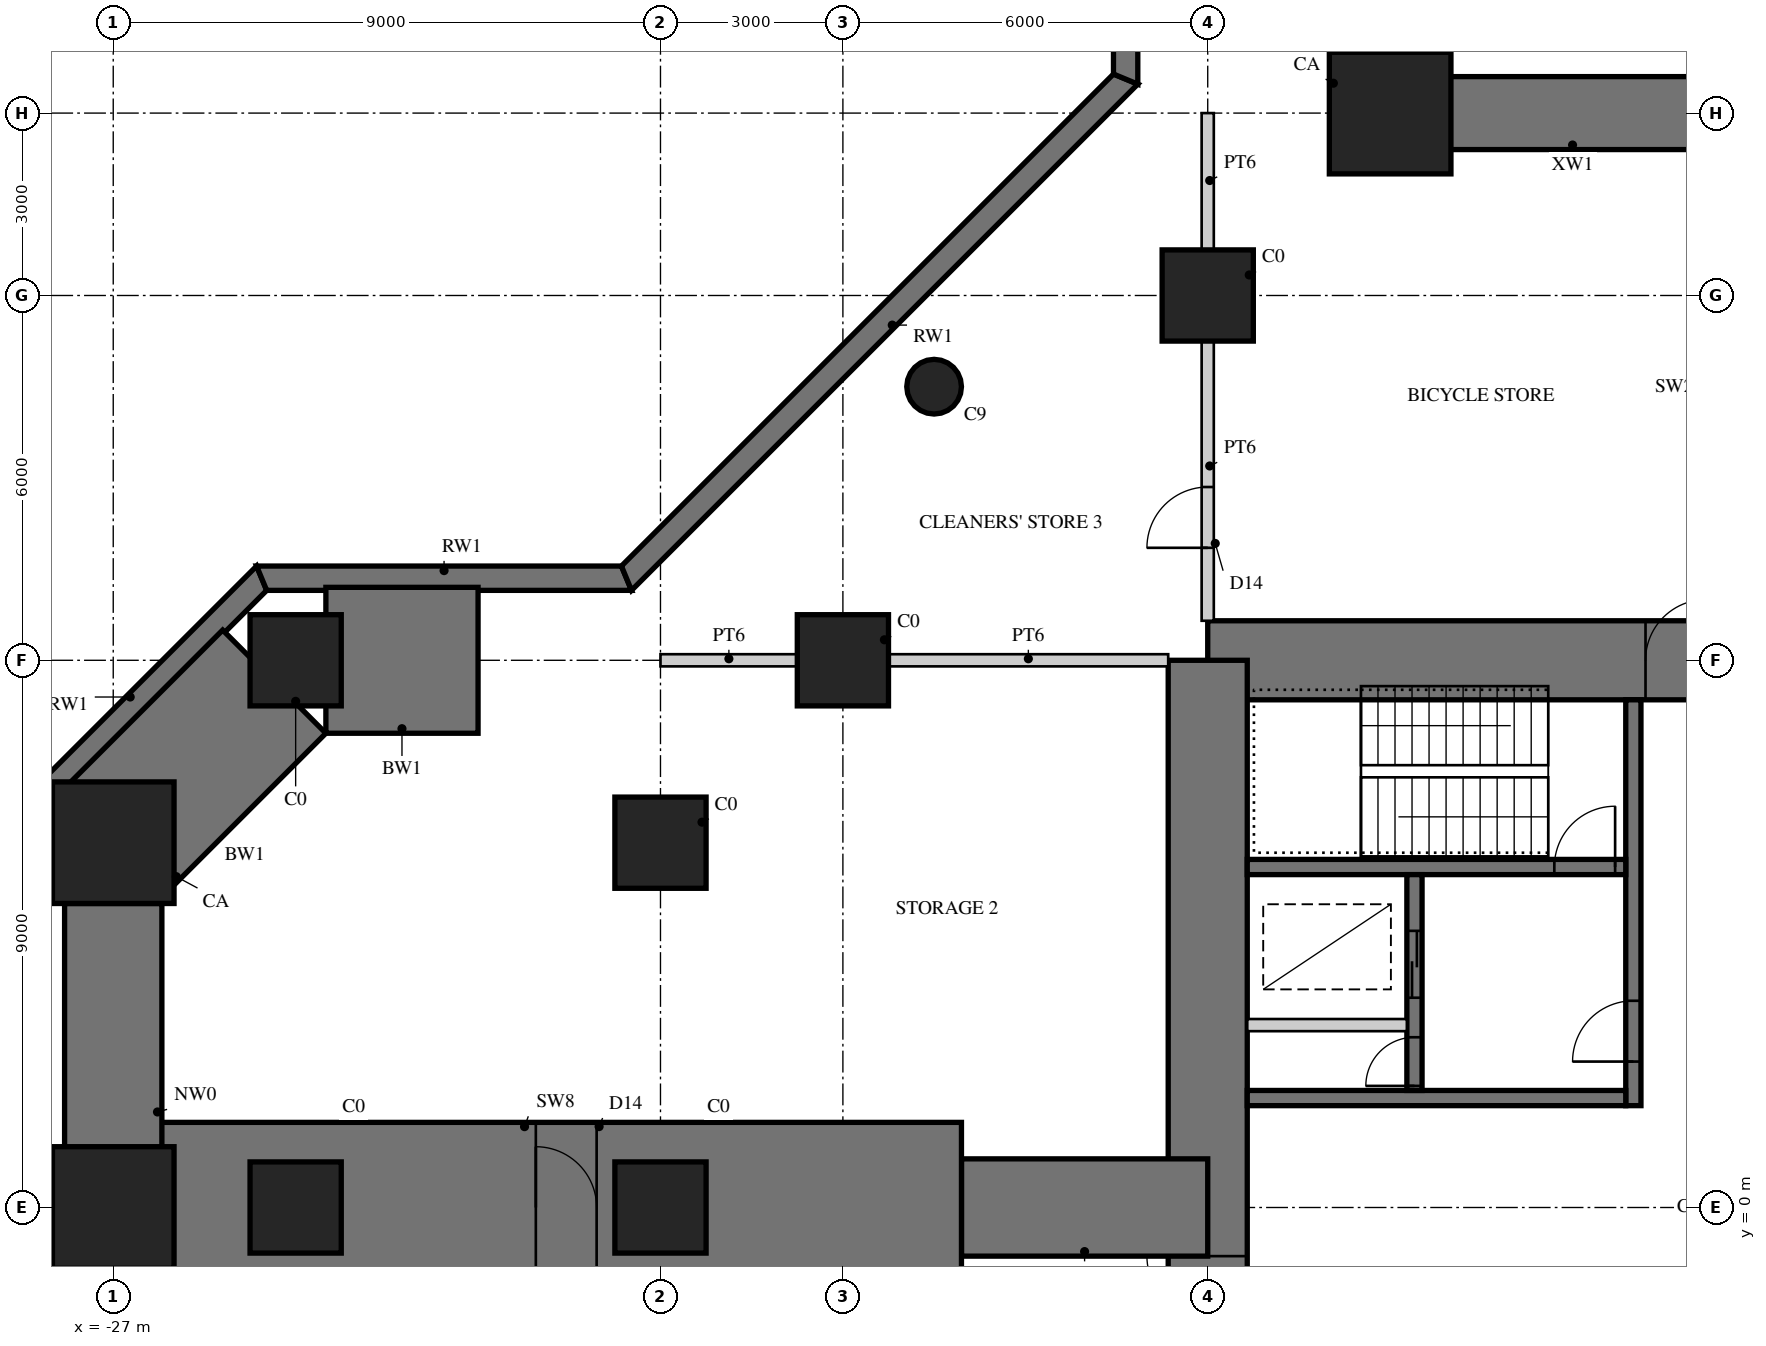
"""IFC4 building model, lengths in metres.
Left out: names, types, materials, properties, quantities, classifications, styles, units other than length and angle.
Written with IfcOpenShell. Run it as: python <this file> out.ifc"""

import sys

from ifc_helpers import new_model, si_unit, direction, frame, frame_2d, origin, origin_2d, place, context, subcontext, project, spatial, polyline, rectangle, circle, outline, extrude, element, fill, save


model = new_model("IFC4")
c1 = context("Model", 3, precision=1e-05, world=origin(), true_north=direction((0.0, 1.0)))
c2 = subcontext(c1, "Body", "Model", "MODEL_VIEW")
j1 = project(units=[si_unit("LENGTHUNIT", "METRE"), si_unit("PLANEANGLEUNIT", "RADIAN")], contexts=[c1])
p1 = place(None, origin())
s1 = spatial("IfcSite", under=j1, at=p1, CompositionType="ELEMENT")
p2 = place(p1, origin())
s2 = spatial("IfcBuilding", under=s1, at=p2, CompositionType="ELEMENT")
p3 = place(p2, frame((0.0, 0.0, -4.0)))
s3 = spatial("IfcBuildingStorey", under=s2, at=p3, CompositionType="ELEMENT", Elevation=-4.0)
p4 = place(p3, origin())
e1 = element("IfcWall", 1, at=p4, inside=s3, PredefinedType="SOLIDWALL", context=c2, shape_type="SweptSolid", body=[
    extrude(outline(polyline([(-28.15, 6.476), (-28.55, 6.642), (-24.642, 10.55), (-24.476, 10.15), (-28.15, 6.476)])), origin(), (0.0, 0.0, 1.0), 4.0),
])
p5 = place(p3, origin())
e2 = element("IfcWall", 2, at=p5, inside=s3, PredefinedType="SOLIDWALL", context=c2, shape_type="SweptSolid", body=[
    extrude(outline(polyline([(-24.476, 10.15), (-24.642, 10.55), (-18.642, 10.55), (-18.476, 10.15), (-24.476, 10.15)])), origin(), (0.0, 0.0, 1.0), 4.0),
])
p6 = place(p3, origin())
e3 = element("IfcWall", 3, at=p6, inside=s3, PredefinedType="SOLIDWALL", context=c2, shape_type="SweptSolid", body=[
    extrude(outline(polyline([(-18.476, 10.15), (-18.642, 10.55), (-10.55, 18.642), (-10.15, 18.476), (-18.476, 10.15)])), origin(), (0.0, 0.0, 1.0), 4.0),
])
p7 = place(p3, origin())
e4 = element("IfcWall", 4, at=p7, inside=s3, PredefinedType="SOLIDWALL", context=c2, shape_type="SweptSolid", body=[
    extrude(outline(polyline([(-10.15, 18.476), (-10.55, 18.642), (-10.55, 24.642), (-10.15, 24.476), (-10.15, 18.476)])), origin(), (0.0, 0.0, 1.0), 4.0),
])
p8 = place(p3, frame((9.0, 9.0, 0.0), z_axis=(0.0, 0.0, 1.0), x_axis=(-1.0, 0.0, 0.0)))
e5 = element("IfcWall", 5, at=p8, inside=s3, PredefinedType="SHEAR", context=c2, shape_type="SweptSolid", body=[
    extrude(rectangle(XDim=18.0, YDim=1.3, at=frame_2d((9.0, 0.0))), origin(), (0.0, 0.0, 1.0), 4.0),
])
p9 = place(p8, frame((9.8, 0.0, 0.0)))
e6 = element("IfcOpeningElement", 6, at=p9, cuts=e5, PredefinedType="OPENING", context=c2, shape_type="SweptSolid", body=[
    extrude(rectangle(XDim=1.0, YDim=2.4, at=frame_2d((0.5, 1.2))), frame((0.0, 0.66, 0.0), z_axis=(0.0, -1.0, 0.0), x_axis=(1.0, 0.0, 0.0)), (0.0, 0.0, 1.0), 1.32),
])
p10 = place(p3, frame((-9.0, 9.0, 0.0), z_axis=(0.0, 0.0, 1.0), x_axis=(0.0, -1.0, 0.0)))
e7 = element("IfcWall", 7, at=p10, inside=s3, PredefinedType="SHEAR", context=c2, shape_type="SweptSolid", body=[
    extrude(rectangle(XDim=18.0, YDim=1.3, at=frame_2d((9.0, 0.0))), origin(), (0.0, 0.0, 1.0), 4.0),
])
p11 = place(p10, frame((9.8, 0.0, 0.0)))
e8 = element("IfcOpeningElement", 8, at=p11, cuts=e7, PredefinedType="OPENING", context=c2, shape_type="SweptSolid", body=[
    extrude(rectangle(XDim=1.0, YDim=2.4, at=frame_2d((0.5, 1.2))), frame((0.0, 0.66, 0.0), z_axis=(0.0, -1.0, 0.0), x_axis=(1.0, 0.0, 0.0)), (0.0, 0.0, 1.0), 1.32),
])
p12 = place(p3, frame((-2.0, 1.675, 0.0), z_axis=(0.0, 0.0, 1.0), x_axis=(0.0, 1.0, 0.0)))
e9 = element("IfcWall", 9, at=p12, inside=s3, PredefinedType="SHEAR", context=c2, shape_type="SweptSolid", body=[
    extrude(rectangle(XDim=6.675, YDim=0.25, at=frame_2d((3.337, 0.0))), origin(), (0.0, 0.0, 1.0), 4.0),
])
p13 = place(p12, frame((0.725, 0.0, 0.0)))
e10 = element("IfcOpeningElement", 10, at=p13, cuts=e9, PredefinedType="OPENING", context=c2, shape_type="SweptSolid", body=[
    extrude(rectangle(XDim=1.0, YDim=2.1, at=frame_2d((0.5, 1.05))), frame((0.0, 0.135, 0.0), z_axis=(0.0, -1.0, 0.0), x_axis=(1.0, 0.0, 0.0)), (0.0, 0.0, 1.0), 0.27),
])
p14 = place(p3, frame((-2.125, 1.8, 0.0), z_axis=(0.0, 0.0, 1.0), x_axis=(-1.0, 0.0, 0.0)))
e11 = element("IfcWall", 11, at=p14, inside=s3, PredefinedType="SHEAR", context=c2, shape_type="SweptSolid", body=[
    extrude(rectangle(XDim=6.225, YDim=0.25, at=frame_2d((3.113, 0.0))), origin(), (0.0, 0.0, 1.0), 4.0),
])
p15 = place(p3, frame((-2.125, 5.6, 0.0), z_axis=(0.0, 0.0, 1.0), x_axis=(-1.0, 0.0, 0.0)))
e12 = element("IfcWall", 12, at=p15, inside=s3, PredefinedType="SHEAR", context=c2, shape_type="SweptSolid", body=[
    extrude(rectangle(XDim=6.225, YDim=0.25, at=frame_2d((3.113, 0.0))), origin(), (0.0, 0.0, 1.0), 4.0),
])
p16 = place(p15, frame((0.175, 0.0, 0.0)))
e13 = element("IfcOpeningElement", 13, at=p16, cuts=e12, PredefinedType="OPENING", context=c2, shape_type="SweptSolid", body=[
    extrude(rectangle(XDim=1.0, YDim=2.1, at=frame_2d((0.5, 1.05))), frame((0.0, 0.135, 0.0), z_axis=(0.0, -1.0, 0.0), x_axis=(1.0, 0.0, 0.0)), (0.0, 0.0, 1.0), 0.27),
])
p17 = place(p3, frame((-5.6, 1.925, 0.0), z_axis=(0.0, 0.0, 1.0), x_axis=(0.0, 1.0, 0.0)))
e14 = element("IfcWall", 14, at=p17, inside=s3, PredefinedType="SHEAR", context=c2, shape_type="SweptSolid", body=[
    extrude(rectangle(XDim=3.55, YDim=0.25, at=frame_2d((1.775, 0.0))), origin(), (0.0, 0.0, 1.0), 4.0),
])
p18 = place(p17, frame((1.525, 0.0, 0.0)))
e15 = element("IfcOpeningElement", 15, at=p18, cuts=e14, PredefinedType="OPENING", context=c2, shape_type="SweptSolid", body=[
    extrude(rectangle(XDim=1.1, YDim=2.2, at=frame_2d((0.55, 1.1))), frame((0.0, 0.135, 0.0), z_axis=(0.0, -1.0, 0.0), x_axis=(1.0, 0.0, 0.0)), (0.0, 0.0, 1.0), 0.27),
])
p19 = place(p17, frame((0.075, 0.0, 0.0)))
e16 = element("IfcOpeningElement", 16, at=p19, cuts=e14, PredefinedType="OPENING", context=c2, shape_type="SweptSolid", body=[
    extrude(rectangle(XDim=0.8, YDim=2.1, at=frame_2d((0.4, 1.05))), frame((0.0, 0.135, 0.0), z_axis=(0.0, -1.0, 0.0), x_axis=(1.0, 0.0, 0.0)), (0.0, 0.0, 1.0), 0.27),
])
p20 = place(p3, frame((-5.725, 3.0, 0.0), z_axis=(0.0, 0.0, 1.0), x_axis=(-1.0, 0.0, 0.0)))
e17 = element("IfcWall", 17, at=p20, inside=s3, PredefinedType="PARTITIONING", context=c2, shape_type="SweptSolid", body=[
    extrude(rectangle(XDim=2.625, YDim=0.2, at=frame_2d((1.312, 0.0))), origin(), (0.0, 0.0, 1.0), 4.0),
])
p21 = place(p3, frame((0.0, 18.0, 0.0), z_axis=(0.0, 0.0, 1.0), x_axis=(-1.0, 0.0, 0.0)))
e18 = element("IfcWall", 18, at=p21, inside=s3, PredefinedType="SHEAR", context=c2, shape_type="SweptSolid", body=[
    extrude(rectangle(XDim=6.0, YDim=1.2, at=frame_2d((3.0, 0.0))), origin(), (0.0, 0.0, 1.0), 4.0),
])
p22 = place(p3, frame((-9.0, 0.0, 0.0), z_axis=(0.0, 0.0, 1.0), x_axis=(-1.0, 0.0, 0.0)))
e19 = element("IfcWall", 19, at=p22, inside=s3, PredefinedType="SHEAR", context=c2, shape_type="SweptSolid", body=[
    extrude(rectangle(XDim=4.05, YDim=1.6, at=frame_2d((2.025, 0.0))), origin(), (0.0, 0.0, 1.0), 4.0),
])
p23 = place(p3, frame((-13.05, 0.0, 0.0), z_axis=(0.0, 0.0, 1.0), x_axis=(-1.0, 0.0, 0.0)))
e20 = element("IfcWall", 20, at=p23, inside=s3, PredefinedType="SHEAR", context=c2, shape_type="SweptSolid", body=[
    extrude(rectangle(XDim=13.95, YDim=2.8, at=frame_2d((6.975, 0.0))), origin(), (0.0, 0.0, 1.0), 4.0),
])
p24 = place(p23, frame((6.0, 0.0, 0.0)))
e21 = element("IfcOpeningElement", 21, at=p24, cuts=e20, PredefinedType="OPENING", context=c2, shape_type="SweptSolid", body=[
    extrude(rectangle(XDim=1.0, YDim=2.2, at=frame_2d((0.5, 1.1))), frame((0.0, 1.41, 0.0), z_axis=(0.0, -1.0, 0.0), x_axis=(1.0, 0.0, 0.0)), (0.0, 0.0, 1.0), 2.82),
])
p25 = place(p3, frame((-21.0, 9.0, 0.0), z_axis=(0.0, 0.0, 1.0), x_axis=(-1.0, 0.0, 0.0)))
e22 = element("IfcWall", 22, at=p25, inside=s3, PredefinedType="SHEAR", context=c2, shape_type="SweptSolid", body=[
    extrude(rectangle(XDim=2.503, YDim=2.4, at=frame_2d((1.251, 0.0))), origin(), (0.0, 0.0, 1.0), 4.0),
])
p26 = place(p3, frame((-24.352, 8.648, 0.0), z_axis=(0.0, 0.0, 1.0), x_axis=(-0.707106781187, -0.707106781187, 0.0)))
e23 = element("IfcWall", 23, at=p26, inside=s3, PredefinedType="SHEAR", context=c2, shape_type="SweptSolid", body=[
    extrude(rectangle(XDim=3.745, YDim=2.4, at=frame_2d((1.873, 0.0))), origin(), (0.0, 0.0, 1.0), 4.0),
])
p27 = place(p3, frame((-27.0, 5.0, 0.0), z_axis=(0.0, 0.0, 1.0), x_axis=(0.0, -1.0, 0.0)))
e24 = element("IfcWall", 24, at=p27, inside=s3, PredefinedType="SHEAR", context=c2, shape_type="SweptSolid", body=[
    extrude(rectangle(XDim=10.0, YDim=1.6, at=frame_2d((5.0, 0.0))), origin(), (0.0, 0.0, 1.0), 4.0),
])
for number, where, z_axis, x_axis in (
    (25, (-9.0, 15.0, 0.0), (0.0, 0.0, 1.0), (1.0, 0.0, 0.0)),
    (26, (-15.0, 9.0, 0.0), (0.0, 0.0, 1.0), (1.0, 0.0, 0.0)),
    (27, (-24.0, 9.0, 0.0), (0.0, 0.0, 1.0), (1.0, 0.0, 0.0)),
):
    element("IfcColumn", number, at=place(p3, frame(where, z_axis=z_axis, x_axis=x_axis)), inside=s3, PredefinedType="COLUMN", context=c2, shape_type="SweptSolid", body=[
        extrude(rectangle(XDim=1.5, YDim=1.5, at=origin_2d()), origin(), (0.0, 0.0, 1.0), 4.0),
    ])
for number, where, z_axis, x_axis in (
    (28, (-27.0, 6.0, 0.0), (0.0, 0.0, 1.0), (1.0, 0.0, 0.0)),
    (29, (-27.0, 0.0, 0.0), (0.0, 0.0, 1.0), (1.0, 0.0, 0.0)),
    (30, (-6.0, 18.0, 0.0), (0.0, 0.0, 1.0), (1.0, 0.0, 0.0)),
):
    element("IfcColumn", number, at=place(p3, frame(where, z_axis=z_axis, x_axis=x_axis)), inside=s3, PredefinedType="COLUMN", context=c2, shape_type="SweptSolid", body=[
        extrude(rectangle(XDim=2.0, YDim=2.0, at=origin_2d()), origin(), (0.0, 0.0, 1.0), 4.0),
    ])
for number, where, z_axis, x_axis in (
    (31, (-18.0, 6.0, 0.0), (0.0, 0.0, 1.0), (1.0, 0.0, 0.0)),
    (32, (-18.0, 0.0, 0.0), (0.0, 0.0, 1.0), (1.0, 0.0, 0.0)),
    (33, (-24.0, 0.0, 0.0), (0.0, 0.0, 1.0), (1.0, 0.0, 0.0)),
):
    element("IfcColumn", number, at=place(p3, frame(where, z_axis=z_axis, x_axis=x_axis)), inside=s3, PredefinedType="COLUMN", context=c2, shape_type="SweptSolid", body=[
        extrude(rectangle(XDim=1.5, YDim=1.5, at=origin_2d()), origin(), (0.0, 0.0, 1.0), 4.0),
    ])
p28 = place(p3, frame((-13.5, 13.5, 0.0), z_axis=(0.0, 0.0, 1.0), x_axis=(1.0, 0.0, 0.0)))
e34 = element("IfcColumn", 34, at=p28, inside=s3, PredefinedType="COLUMN", context=c2, shape_type="SweptSolid", body=[
    extrude(circle(Radius=0.45, at=origin_2d()), origin(), (0.0, 0.0, 1.0), 4.0),
])
p29 = place(p3, frame((-9.0, 9.65, 0.0), z_axis=(0.0, 0.0, 1.0), x_axis=(0.0, 1.0, 0.0)))
e35 = element("IfcWall", 35, at=p29, inside=s3, PredefinedType="SOLIDWALL", context=c2, shape_type="SweptSolid", body=[
    extrude(rectangle(XDim=4.6, YDim=0.2, at=frame_2d((2.3, 0.0))), origin(), (0.0, 0.0, 1.0), 2.7),
])
p30 = place(p29, frame((1.2, 0.0, 0.0)))
e36 = element("IfcOpeningElement", 36, at=p30, cuts=e35, PredefinedType="OPENING", context=c2, shape_type="SweptSolid", body=[
    extrude(rectangle(XDim=1.0, YDim=2.2, at=frame_2d((0.5, 1.1))), frame((0.0, 0.11, 0.0), z_axis=(0.0, -1.0, 0.0), x_axis=(1.0, 0.0, 0.0)), (0.0, 0.0, 1.0), 0.22),
])
p31 = place(p3, frame((-9.0, 15.75, 0.0), z_axis=(0.0, 0.0, 1.0), x_axis=(0.0, 1.0, 0.0)))
e37 = element("IfcWall", 37, at=p31, inside=s3, PredefinedType="SOLIDWALL", context=c2, shape_type="SweptSolid", body=[
    extrude(rectangle(XDim=2.25, YDim=0.2, at=frame_2d((1.125, 0.0))), origin(), (0.0, 0.0, 1.0), 2.7),
])
p32 = place(p3, frame((-14.25, 9.0, 0.0), z_axis=(0.0, 0.0, 1.0), x_axis=(1.0, 0.0, 0.0)))
e38 = element("IfcWall", 38, at=p32, inside=s3, PredefinedType="SOLIDWALL", context=c2, shape_type="SweptSolid", body=[
    extrude(rectangle(XDim=4.6, YDim=0.2, at=frame_2d((2.3, 0.0))), origin(), (0.0, 0.0, 1.0), 2.7),
])
p33 = place(p3, frame((-18.0, 9.0, 0.0), z_axis=(0.0, 0.0, 1.0), x_axis=(1.0, 0.0, 0.0)))
e39 = element("IfcWall", 39, at=p33, inside=s3, PredefinedType="SOLIDWALL", context=c2, shape_type="SweptSolid", body=[
    extrude(rectangle(XDim=2.25, YDim=0.2, at=frame_2d((1.125, 0.0))), origin(), (0.0, 0.0, 1.0), 2.7),
])
p34 = place(p30, origin())
e40 = element("IfcDoor", 40, at=p34, inside=s3, OperationType="SINGLE_SWING_LEFT", PredefinedType="DOOR", context=c2, shape_type="SweptSolid", body=[
    extrude(rectangle(XDim=1.0, YDim=2.2, at=frame_2d((0.5, 1.1))), frame((0.0, 0.025, 0.0), z_axis=(0.0, -1.0, 0.0), x_axis=(1.0, 0.0, 0.0)), (0.0, 0.0, 1.0), 0.05),
])
fill(e36, e40)
p35 = place(p24, frame((1.0, 0.0, 0.0), z_axis=(0.0, 0.0, 1.0), x_axis=(-1.0, 0.0, 0.0)))
e41 = element("IfcDoor", 41, at=p35, inside=s3, OperationType="SINGLE_SWING_LEFT", PredefinedType="DOOR", context=c2, shape_type="SweptSolid", body=[
    extrude(rectangle(XDim=1.0, YDim=2.2, at=frame_2d((0.5, 1.1))), frame((0.0, 0.025, 0.0), z_axis=(0.0, -1.0, 0.0), x_axis=(1.0, 0.0, 0.0)), (0.0, 0.0, 1.0), 0.05),
])
fill(e21, e41)
p36 = place(p9, frame((1.0, 0.0, 0.0), z_axis=(0.0, 0.0, 1.0), x_axis=(-1.0, 0.0, 0.0)))
e42 = element("IfcDoor", 42, at=p36, inside=s3, OperationType="SINGLE_SWING_RIGHT", PredefinedType="DOOR", context=c2, shape_type="SweptSolid", body=[
    extrude(rectangle(XDim=1.0, YDim=2.4, at=frame_2d((0.5, 1.2))), frame((0.0, -0.005, 0.0), z_axis=(0.0, -1.0, 0.0), x_axis=(1.0, 0.0, 0.0)), (0.0, 0.0, 1.0), 0.05),
])
fill(e6, e42)
p37 = place(p11, frame((1.0, 0.0, 0.0), z_axis=(0.0, 0.0, 1.0), x_axis=(-1.0, 0.0, 0.0)))
e43 = element("IfcDoor", 43, at=p37, inside=s3, OperationType="SINGLE_SWING_RIGHT", PredefinedType="DOOR", context=c2, shape_type="SweptSolid", body=[
    extrude(rectangle(XDim=1.0, YDim=2.4, at=frame_2d((0.5, 1.2))), frame((0.0, -0.005, 0.0), z_axis=(0.0, -1.0, 0.0), x_axis=(1.0, 0.0, 0.0)), (0.0, 0.0, 1.0), 0.05),
])
fill(e8, e43)
p38 = place(p13, origin())
e44 = element("IfcDoor", 44, at=p38, inside=s3, OperationType="SINGLE_SWING_LEFT", PredefinedType="DOOR", context=c2, shape_type="SweptSolid", body=[
    extrude(rectangle(XDim=1.0, YDim=2.1, at=frame_2d((0.5, 1.05))), frame((0.0, 0.025, 0.0), z_axis=(0.0, -1.0, 0.0), x_axis=(1.0, 0.0, 0.0)), (0.0, 0.0, 1.0), 0.05),
])
fill(e10, e44)
p39 = place(p16, frame((1.0, 0.0, 0.0), z_axis=(0.0, 0.0, 1.0), x_axis=(-1.0, 0.0, 0.0)))
e45 = element("IfcDoor", 45, at=p39, inside=s3, OperationType="SINGLE_SWING_RIGHT", PredefinedType="DOOR", context=c2, shape_type="SweptSolid", body=[
    extrude(rectangle(XDim=1.0, YDim=2.1, at=frame_2d((0.5, 1.05))), frame((0.0, 0.025, 0.0), z_axis=(0.0, -1.0, 0.0), x_axis=(1.0, 0.0, 0.0)), (0.0, 0.0, 1.0), 0.05),
])
fill(e13, e45)
p40 = place(p18, origin())
e46 = element("IfcDoor", 46, at=p40, inside=s3, OperationType="DOUBLE_DOOR_SLIDING", PredefinedType="DOOR", context=c2, shape_type="SweptSolid", body=[
    extrude(rectangle(XDim=1.1, YDim=2.2, at=frame_2d((0.55, 1.1))), frame((0.0, 0.025, 0.0), z_axis=(0.0, -1.0, 0.0), x_axis=(1.0, 0.0, 0.0)), (0.0, 0.0, 1.0), 0.05),
])
fill(e15, e46)
p41 = place(p19, origin())
e47 = element("IfcDoor", 47, at=p41, inside=s3, OperationType="SINGLE_SWING_LEFT", PredefinedType="DOOR", context=c2, shape_type="SweptSolid", body=[
    extrude(rectangle(XDim=0.8, YDim=2.1, at=frame_2d((0.4, 1.05))), frame((0.0, 0.025, 0.0), z_axis=(0.0, -1.0, 0.0), x_axis=(1.0, 0.0, 0.0)), (0.0, 0.0, 1.0), 0.05),
])
fill(e16, e47)
save(model, sys.argv[1])
